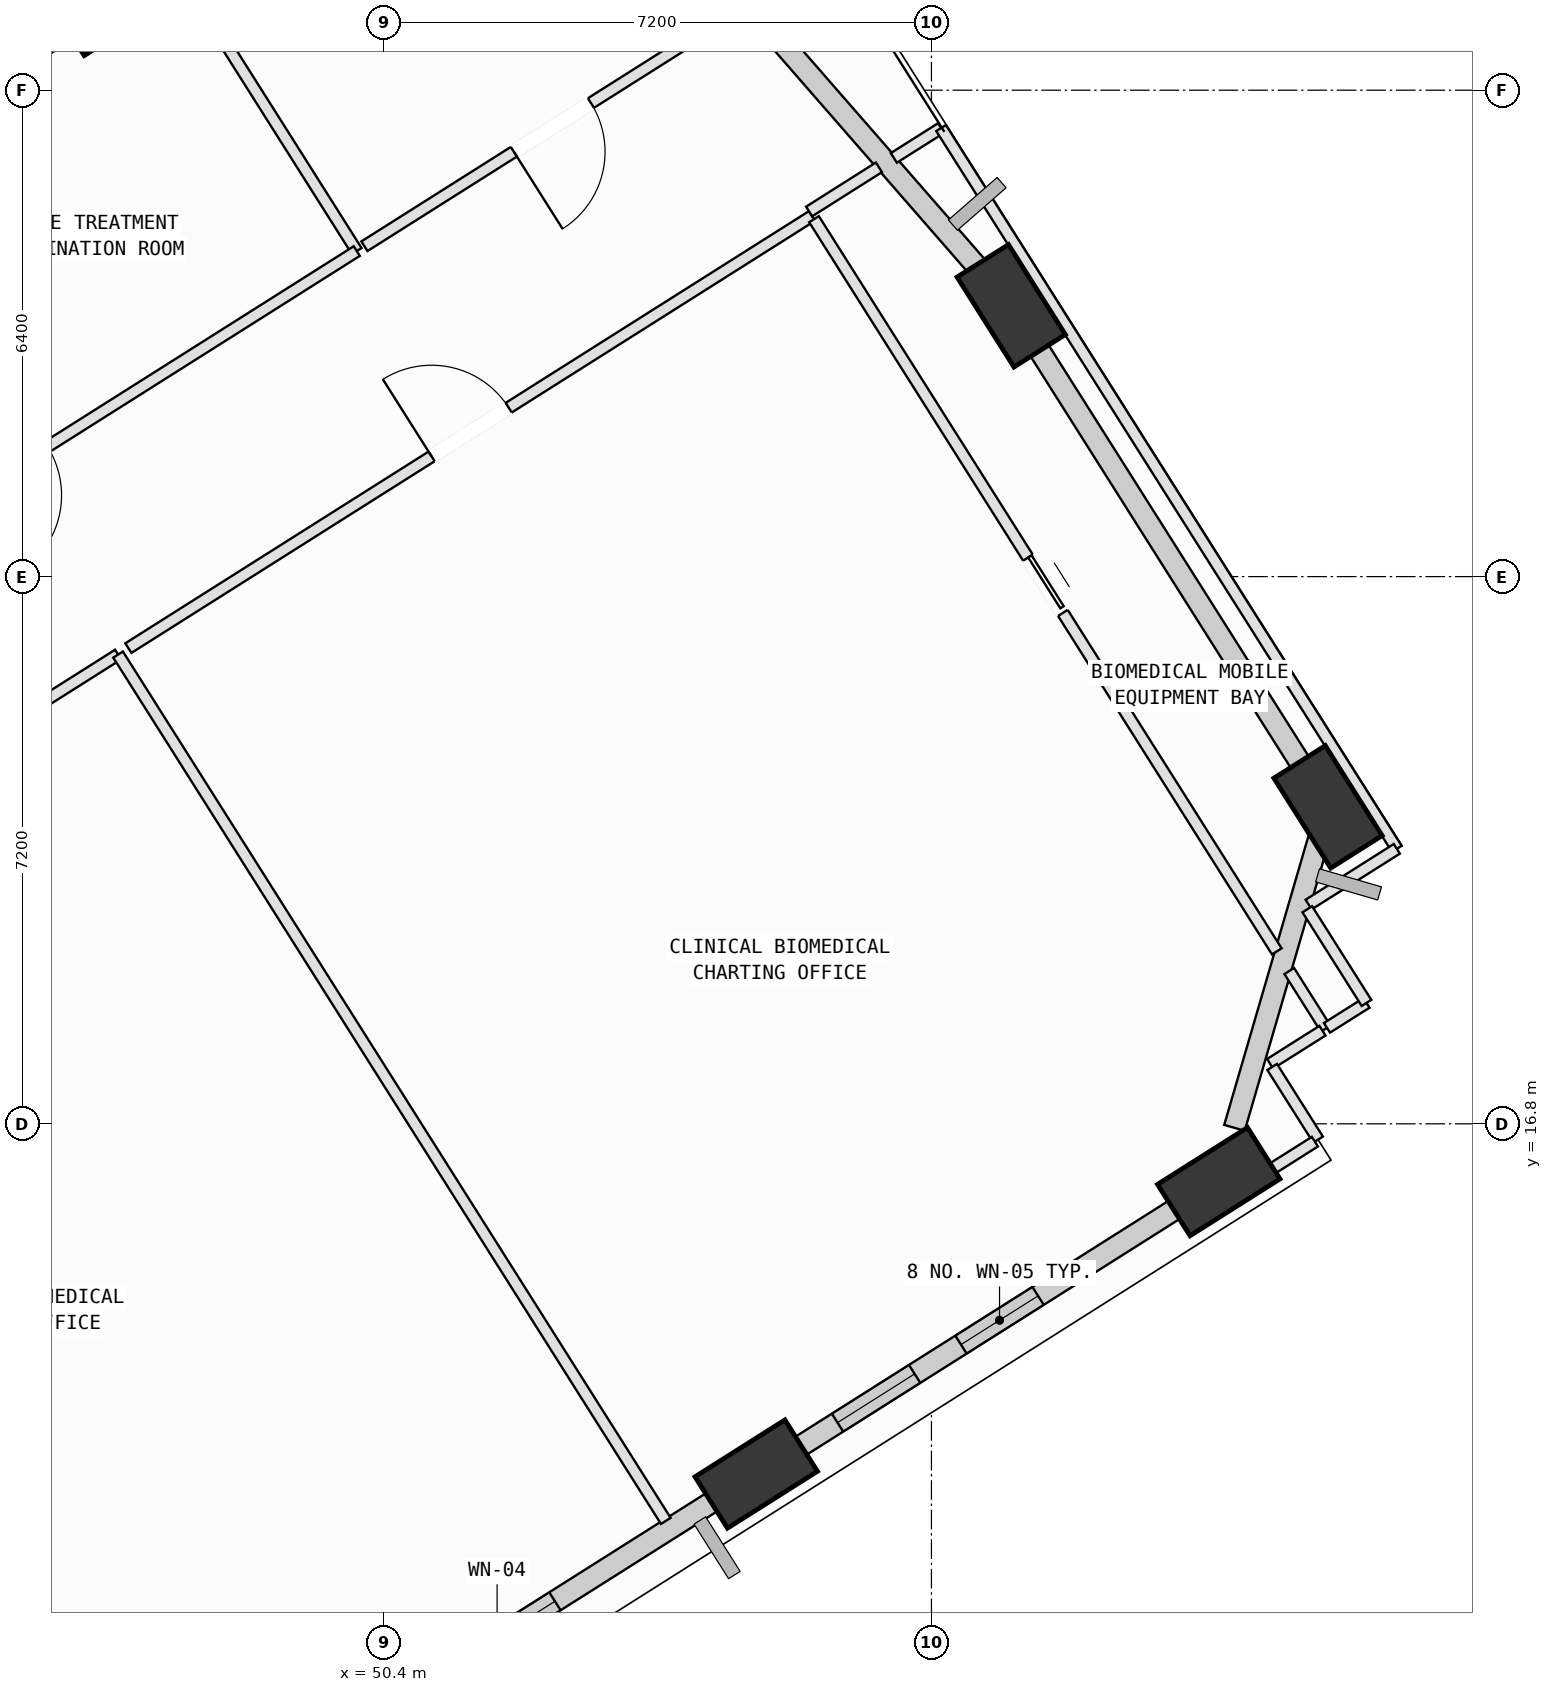
"""IFC4 building model, lengths in metres.
Left out: names, types, materials, properties, quantities, classifications, styles, units other than length and angle.
Written with IfcOpenShell. Run it as: python <this file> out.ifc"""

import sys

from ifc_helpers import new_model, si_unit, direction, frame, frame_2d, origin, origin_2d, place, context, subcontext, project, spatial, rectangle, extrude, element, fill, save


model = new_model("IFC4")
c1 = context("Model", 3, precision=1e-05, world=origin(), true_north=direction((0.0, 1.0)))
c2 = subcontext(c1, "Body", "Model", "MODEL_VIEW")
j1 = project(units=[si_unit("LENGTHUNIT", "METRE"), si_unit("PLANEANGLEUNIT", "RADIAN")], contexts=[c1])
p1 = place(None, origin())
s1 = spatial("IfcSite", under=j1, at=p1, CompositionType="ELEMENT")
p2 = place(p1, origin())
s2 = spatial("IfcBuilding", under=s1, at=p2, CompositionType="ELEMENT")
p3 = place(p2, frame((0.0, 0.0, 161.8)))
s3 = spatial("IfcBuildingStorey", under=s2, at=p3, CompositionType="ELEMENT", Elevation=161.8)
p4 = place(p3, frame((55.294, 12.192, 0.002), z_axis=(0.051223513882, 0.089869011899, 0.994635467056), x_axis=(-0.997536992389, -0.04318182071, 0.055274579841)))
e1 = element("IfcColumn", 1, at=p4, inside=s3, PredefinedType="COLUMN", context=c2, shape_type="SweptSolid", body=[
    extrude(rectangle(XDim=1.4, YDim=0.8, at=origin_2d()), origin(), (0.0, 0.0, 1.0), 4.018),
])
p5 = place(p3, frame((61.38, 16.039, 0.002), z_axis=(0.035116863046, 0.114569523824, 0.992794354406), x_axis=(-0.963617165192, -0.259503165934, 0.064031756314)))
e2 = element("IfcColumn", 2, at=p5, inside=s3, PredefinedType="COLUMN", context=c2, shape_type="SweptSolid", body=[
    extrude(rectangle(XDim=1.4, YDim=0.8, at=origin_2d()), origin(), (0.0, 0.0, 1.0), 4.025),
])
p6 = place(p3, frame((62.818, 20.97, 0.002), z_axis=(0.014796306441, 0.120310950736, 0.99262598417), x_axis=(0.427941166072, -0.897980076646, 0.102460432986)))
e3 = element("IfcColumn", 3, at=p6, inside=s3, PredefinedType="COLUMN", context=c2, shape_type="SweptSolid", body=[
    extrude(rectangle(XDim=1.4, YDim=0.8, at=origin_2d()), origin(), (0.0, 0.0, 1.0), 4.026),
])
p7 = place(p3, frame((58.65, 27.563, 0.002), z_axis=(-0.012212860445, 0.103171328532, 0.994588619988), x_axis=(0.62947347893, -0.772043748813, 0.087815654881)))
e4 = element("IfcColumn", 4, at=p7, inside=s3, PredefinedType="COLUMN", context=c2, shape_type="SweptSolid", body=[
    extrude(rectangle(XDim=1.4, YDim=0.8, at=origin_2d()), origin(), (0.0, 0.0, 1.0), 4.018),
])
p8 = place(p3, frame((46.831, 31.567, 0.002), z_axis=(-0.028475531093, 0.054512044533, 0.998106998838), x_axis=(-0.502261756691, -0.864090923747, 0.032863403107)))
e5 = element("IfcColumn", 5, at=p8, inside=s3, PredefinedType="COLUMN", context=c2, shape_type="SweptSolid", body=[
    extrude(rectangle(XDim=1.4, YDim=0.8, at=origin_2d()), origin(), (0.0, 0.0, 1.0), 4.004),
])
p9 = place(p3, frame((55.038, 12.03, 0.0), z_axis=(0.0, 0.0, 1.0), x_axis=(-0.845251842868, -0.53436815224, 0.0)))
e6 = element("IfcWall", 6, at=p9, inside=s3, PredefinedType="SOLIDWALL", context=c2, shape_type="SweptSolid", body=[
    extrude(rectangle(XDim=6.218, YDim=0.28, at=frame_2d((3.109, 0.0))), origin(), (0.0, 0.0, 1.0), 3.165),
])
p10 = place(p9, frame((2.83, 0.0, 0.75)))
e7 = element("IfcOpeningElement", 7, at=p10, cuts=e6, PredefinedType="OPENING", context=c2, shape_type="SweptSolid", body=[
    extrude(rectangle(XDim=1.8, YDim=2.05, at=frame_2d((0.9, 1.025))), frame((0.0, 0.15, 0.0), z_axis=(0.0, -1.0, 0.0), x_axis=(1.0, 0.0, 0.0)), (0.0, 0.0, 1.0), 0.3),
])
p11 = place(p3, frame((61.137, 15.885, 0.0), z_axis=(0.0, 0.0, 1.0), x_axis=(-0.845271359126, -0.534337280602, 0.0)))
e8 = element("IfcWall", 8, at=p11, inside=s3, PredefinedType="SOLIDWALL", context=c2, shape_type="SweptSolid", body=[
    extrude(rectangle(XDim=6.242, YDim=0.28, at=frame_2d((3.121, 0.0))), origin(), (0.0, 0.0, 1.0), 3.165),
])
p12 = place(p11, frame((2.525, 0.0, 0.75)))
e9 = element("IfcOpeningElement", 9, at=p12, cuts=e8, PredefinedType="OPENING", context=c2, shape_type="SweptSolid", body=[
    extrude(rectangle(XDim=1.2, YDim=1.75, at=frame_2d((0.6, 0.875))), frame((0.0, 0.15, 0.0), z_axis=(0.0, -1.0, 0.0), x_axis=(1.0, 0.0, 0.0)), (0.0, 0.0, 1.0), 0.3),
])
p13 = place(p11, frame((4.446, 0.0, 0.75)))
e10 = element("IfcOpeningElement", 10, at=p13, cuts=e8, PredefinedType="OPENING", context=c2, shape_type="SweptSolid", body=[
    extrude(rectangle(XDim=1.2, YDim=1.75, at=frame_2d((0.6, 0.875))), frame((0.0, 0.15, 0.0), z_axis=(0.0, -1.0, 0.0), x_axis=(1.0, 0.0, 0.0)), (0.0, 0.0, 1.0), 0.3),
])
p14 = place(p3, frame((62.747, 20.727, 0.0), z_axis=(0.0, 0.0, 1.0), x_axis=(-0.279882390753, -0.96003429488, 0.0)))
e11 = element("IfcWall", 11, at=p14, inside=s3, PredefinedType="SOLIDWALL", context=c2, shape_type="SweptSolid", body=[
    extrude(rectangle(XDim=4.145, YDim=0.28, at=frame_2d((2.073, 0.0))), origin(), (0.0, 0.0, 1.0), 3.165),
])
p15 = place(p3, frame((58.81, 27.31, 0.0), z_axis=(0.0, 0.0, 1.0), x_axis=(0.534364927874, -0.845253881303, 0.0)))
e12 = element("IfcWall", 12, at=p15, inside=s3, PredefinedType="SOLIDWALL", context=c2, shape_type="SweptSolid", body=[
    extrude(rectangle(XDim=6.84, YDim=0.28, at=frame_2d((3.42, 0.0))), origin(), (0.0, 0.0, 1.0), 3.165),
])
p16 = place(p3, frame((52.411, 34.717, 0.0), z_axis=(0.0, 0.0, 1.0), x_axis=(0.657255929189, -0.753667462178, 0.0)))
e13 = element("IfcWall", 13, at=p16, inside=s3, PredefinedType="SOLIDWALL", context=c2, shape_type="SweptSolid", body=[
    extrude(rectangle(XDim=8.838, YDim=0.28, at=frame_2d((4.419, 0.0))), origin(), (0.0, 0.0, 1.0), 3.165),
])
p17 = place(p3, frame((43.738, 29.612, 0.0), z_axis=(0.0, 0.0, 1.0), x_axis=(0.845268690178, 0.534341502604, 0.0)))
e14 = element("IfcWall", 14, at=p17, inside=s3, PredefinedType="SOLIDWALL", context=c2, shape_type="SweptSolid", body=[
    extrude(rectangle(XDim=3.189, YDim=0.28, at=frame_2d((1.594, 0.0))), origin(), (0.0, 0.0, 1.0), 3.045),
])
p18 = place(p17, frame((0.915, 0.0, 0.75)))
e15 = element("IfcOpeningElement", 15, at=p18, cuts=e14, PredefinedType="OPENING", context=c2, shape_type="SweptSolid", body=[
    extrude(rectangle(XDim=1.2, YDim=1.75, at=frame_2d((0.6, 0.875))), frame((0.0, 0.15, 0.0), z_axis=(0.0, -1.0, 0.0), x_axis=(1.0, 0.0, 0.0)), (0.0, 0.0, 1.0), 0.3),
])
p19 = place(p3, frame((41.23, 19.39, 0.0), z_axis=(0.0, 0.0, 1.0), x_axis=(0.845230176883, 0.534402421482, 0.0)))
e16 = element("IfcWall", 16, at=p19, inside=s3, PredefinedType="PARTITIONING", context=c2, shape_type="SweptSolid", body=[
    extrude(rectangle(XDim=6.707, YDim=0.15, at=frame_2d((3.354, 0.0))), origin(), (0.0, 0.0, 1.0), 3.065),
])
p20 = place(p19, frame((2.753, 0.0, 0.0)))
e17 = element("IfcOpeningElement", 17, at=p20, cuts=e16, PredefinedType="OPENING", context=c2, shape_type="SweptSolid", body=[
    extrude(rectangle(XDim=1.2, YDim=2.15, at=frame_2d((0.6, 1.075))), frame((0.0, 0.085, 0.0), z_axis=(0.0, -1.0, 0.0), x_axis=(1.0, 0.0, 0.0)), (0.0, 0.0, 1.0), 0.17),
])
p21 = place(p3, frame((46.899, 22.974, 0.0), z_axis=(0.0, 0.0, 1.0), x_axis=(0.534341679517, -0.845268578341, 0.0)))
e18 = element("IfcWall", 18, at=p21, inside=s3, PredefinedType="PARTITIONING", context=c2, shape_type="SweptSolid", body=[
    extrude(rectangle(XDim=13.486, YDim=0.15, at=frame_2d((6.743, 0.0))), origin(), (0.0, 0.0, 1.0), 3.415),
])
p22 = place(p3, frame((47.034, 23.059, 0.0), z_axis=(0.0, 0.0, 1.0), x_axis=(0.845254384561, 0.534364131825, 0.0)))
e19 = element("IfcWall", 19, at=p22, inside=s3, PredefinedType="PARTITIONING", context=c2, shape_type="SweptSolid", body=[
    extrude(rectangle(XDim=10.641, YDim=0.15, at=frame_2d((5.32, 0.0))), origin(), (0.0, 0.0, 1.0), 3.78),
])
p23 = place(p22, frame((4.72, 0.0, 0.0)))
e20 = element("IfcOpeningElement", 20, at=p23, cuts=e19, PredefinedType="OPENING", context=c2, shape_type="SweptSolid", body=[
    extrude(rectangle(XDim=1.2, YDim=2.15, at=frame_2d((0.6, 1.075))), frame((0.0, 0.085, 0.0), z_axis=(0.0, -1.0, 0.0), x_axis=(1.0, 0.0, 0.0)), (0.0, 0.0, 1.0), 0.17),
])
p24 = place(p3, frame((56.055, 28.703, 0.0), z_axis=(0.0, 0.0, 1.0), x_axis=(0.534282303531, -0.845306110314, 0.0)))
e21 = element("IfcWall", 21, at=p24, inside=s3, PredefinedType="PARTITIONING", context=c2, shape_type="SweptSolid", body=[
    extrude(rectangle(XDim=11.397, YDim=0.15, at=frame_2d((5.698, 0.0))), origin(), (0.0, 0.0, 1.0), 3.78),
])
p25 = place(p24, frame((5.269, 0.0, 0.0)))
e22 = element("IfcOpeningElement", 22, at=p25, cuts=e21, PredefinedType="OPENING", context=c2, shape_type="SweptSolid", body=[
    extrude(rectangle(XDim=0.86, YDim=2.06, at=frame_2d((0.43, 1.03))), frame((0.0, 0.085, 0.0), z_axis=(0.0, -1.0, 0.0), x_axis=(1.0, 0.0, 0.0)), (0.0, 0.0, 1.0), 0.17),
])
p26 = place(p3, frame((62.308, 18.81, 0.0), z_axis=(0.0, 0.0, 1.0), x_axis=(0.534177361829, -0.845372430417, 0.0)))
e23 = element("IfcWall", 23, at=p26, inside=s3, PredefinedType="PARTITIONING", context=c2, shape_type="SweptSolid", body=[
    extrude(rectangle(XDim=0.897, YDim=0.15, at=frame_2d((0.448, 0.0))), origin(), (0.0, 0.0, 1.0), 3.78),
])
p27 = place(p3, frame((62.745, 18.025, 0.0), z_axis=(0.0, 0.0, 1.0), x_axis=(-0.845752205071, -0.533575868661, 0.0)))
e24 = element("IfcWall", 24, at=p27, inside=s3, PredefinedType="PARTITIONING", context=c2, shape_type="SweptSolid", body=[
    extrude(rectangle(XDim=0.815, YDim=0.15, at=frame_2d((0.407, 0.0))), origin(), (0.0, 0.0, 1.0), 3.78),
])
p28 = place(p3, frame((62.083, 17.548, 0.0), z_axis=(0.0, 0.0, 1.0), x_axis=(0.534106701777, -0.845417075246, 0.0)))
e25 = element("IfcWall", 25, at=p28, inside=s3, PredefinedType="PARTITIONING", context=c2, shape_type="SweptSolid", body=[
    extrude(rectangle(XDim=1.131, YDim=0.15, at=frame_2d((0.565, 0.0))), origin(), (0.0, 0.0, 1.0), 3.78),
])
p29 = place(p3, frame((62.645, 16.565, 0.0), z_axis=(0.0, 0.0, 1.0), x_axis=(-0.845418071895, -0.534105124215, 0.0)))
e26 = element("IfcWall", 26, at=p29, inside=s3, PredefinedType="PARTITIONING", context=c2, shape_type="SweptSolid", body=[
    extrude(rectangle(XDim=1.638, YDim=0.15, at=frame_2d((0.819, 0.0))), origin(), (0.0, 0.0, 1.0), 3.78),
])
p30 = place(p3, frame((55.984, 12.355, 0.0), z_axis=(0.0, 0.0, 1.0), x_axis=(-0.845381621372, -0.534162816233, 0.0)))
e27 = element("IfcWall", 27, at=p30, inside=s3, PredefinedType="PARTITIONING", context=c2, shape_type="SweptSolid", body=[
    extrude(rectangle(XDim=0.974, YDim=0.15, at=frame_2d((0.487, 0.0))), origin(), (0.0, 0.0, 1.0), 3.165),
])
p31 = place(p3, frame((47.701, 31.981, 0.0), z_axis=(0.0, 0.0, 1.0), x_axis=(0.534410719014, -0.845224930657, 0.0)))
e28 = element("IfcWall", 28, at=p31, inside=s3, PredefinedType="PARTITIONING", context=c2, shape_type="SweptSolid", body=[
    extrude(rectangle(XDim=4.375, YDim=0.15, at=frame_2d((2.188, 0.0))), origin(), (0.0, 0.0, 1.0), 3.78),
])
p32 = place(p3, frame((50.039, 28.283, 0.0), z_axis=(0.0, 0.0, 1.0), x_axis=(-0.845280431179, -0.534322929197, 0.0)))
e29 = element("IfcWall", 29, at=p32, inside=s3, PredefinedType="PARTITIONING", context=c2, shape_type="SweptSolid", body=[
    extrude(rectangle(XDim=10.828, YDim=0.15, at=frame_2d((5.414, 0.0))), origin(), (0.0, 0.0, 1.0), 3.78),
])
p33 = place(p32, frame((4.814, 0.0, 0.0)))
e30 = element("IfcOpeningElement", 30, at=p33, cuts=e29, PredefinedType="OPENING", context=c2, shape_type="SweptSolid", body=[
    extrude(rectangle(XDim=1.2, YDim=2.15, at=frame_2d((0.6, 1.075))), frame((0.0, 0.085, 0.0), z_axis=(0.0, -1.0, 0.0), x_axis=(1.0, 0.0, 0.0)), (0.0, 0.0, 1.0), 0.17),
])
p34 = place(p3, frame((55.086, 31.474, 0.0), z_axis=(0.0, 0.0, 1.0), x_axis=(-0.845228065929, -0.534405760229, 0.0)))
e31 = element("IfcWall", 31, at=p34, inside=s3, PredefinedType="PARTITIONING", context=c2, shape_type="SweptSolid", body=[
    extrude(rectangle(XDim=5.852, YDim=0.15, at=frame_2d((2.926, 0.0))), origin(), (0.0, 0.0, 1.0), 3.78),
])
p35 = place(p34, frame((2.326, 0.0, 0.0)))
e32 = element("IfcOpeningElement", 32, at=p35, cuts=e31, PredefinedType="OPENING", context=c2, shape_type="SweptSolid", body=[
    extrude(rectangle(XDim=1.2, YDim=2.15, at=frame_2d((0.6, 1.075))), frame((0.0, 0.085, 0.0), z_axis=(0.0, -1.0, 0.0), x_axis=(1.0, 0.0, 0.0)), (0.0, 0.0, 1.0), 0.17),
])
p36 = place(p3, frame((63.324, 18.391, 0.0), z_axis=(0.0, 0.0, 1.0), x_axis=(-0.845715263121, -0.533634419547, 0.0)))
e33 = element("IfcWall", 33, at=p36, inside=s3, PredefinedType="PARTITIONING", context=c2, shape_type="SweptSolid", body=[
    extrude(rectangle(XDim=0.615, YDim=0.15, at=frame_2d((0.308, 0.0))), origin(), (0.0, 0.0, 1.0), 3.78),
])
p37 = place(p3, frame((55.991, 28.804, 0.0), z_axis=(0.0, 0.0, 1.0), x_axis=(0.844954487562, 0.534838212872, 0.0)))
e34 = element("IfcWall", 34, at=p37, inside=s3, PredefinedType="PARTITIONING", context=c2, shape_type="SweptSolid", body=[
    extrude(rectangle(XDim=1.086, YDim=0.15, at=frame_2d((0.543, 0.0))), origin(), (0.0, 0.0, 1.0), 3.78),
])
p38 = place(p3, frame((57.105, 29.509, 0.0), z_axis=(0.0, 0.0, 1.0), x_axis=(0.845378510232, 0.534167739982, 0.0)))
e35 = element("IfcWall", 35, at=p38, inside=s3, PredefinedType="PARTITIONING", context=c2, shape_type="SweptSolid", body=[
    extrude(rectangle(XDim=0.736, YDim=0.15, at=frame_2d((0.368, 0.0))), origin(), (0.0, 0.0, 1.0), 3.78),
])
p39 = place(p3, frame((57.727, 29.902, 0.0), z_axis=(0.0, 0.0, 1.0), x_axis=(0.534367056092, -0.845252535852, 0.0)))
e36 = element("IfcWall", 36, at=p39, inside=s3, PredefinedType="PARTITIONING", context=c2, shape_type="SweptSolid", body=[
    extrude(rectangle(XDim=11.22, YDim=0.15, at=frame_2d((5.61, 0.0))), origin(), (0.0, 0.0, 1.0), 3.165),
])
p40 = place(p3, frame((63.723, 20.418, 0.0), z_axis=(0.0, 0.0, 1.0), x_axis=(-0.845378951725, -0.534167041271, 0.0)))
e37 = element("IfcWall", 37, at=p40, inside=s3, PredefinedType="PARTITIONING", context=c2, shape_type="SweptSolid", body=[
    extrude(rectangle(XDim=1.372, YDim=0.15, at=frame_2d((0.686, 0.0))), origin(), (0.0, 0.0, 1.0), 3.78),
])
p41 = place(p3, frame((62.545, 19.623, 0.0), z_axis=(0.0, 0.0, 1.0), x_axis=(0.534478142886, -0.845182296772, 0.0)))
e38 = element("IfcWall", 38, at=p41, inside=s3, PredefinedType="PARTITIONING", context=c2, shape_type="SweptSolid", body=[
    extrude(rectangle(XDim=1.458, YDim=0.15, at=frame_2d((0.729, 0.0))), origin(), (0.0, 0.0, 1.0), 3.78),
])
p42 = place(p10, origin())
e39 = element("IfcWindow", 39, at=p42, inside=s3, PartitioningType="SINGLE_PANEL", PredefinedType="WINDOW", context=c2, shape_type="SweptSolid", body=[
    extrude(rectangle(XDim=1.8, YDim=2.05, at=frame_2d((0.9, 1.025))), frame((0.0, 0.03, 0.0), z_axis=(0.0, -1.0, 0.0), x_axis=(1.0, 0.0, 0.0)), (0.0, 0.0, 1.0), 0.06),
])
fill(e7, e39)
p43 = place(p12, origin())
e40 = element("IfcWindow", 40, at=p43, inside=s3, PartitioningType="SINGLE_PANEL", PredefinedType="WINDOW", context=c2, shape_type="SweptSolid", body=[
    extrude(rectangle(XDim=1.2, YDim=1.75, at=frame_2d((0.6, 0.875))), frame((0.0, 0.03, 0.0), z_axis=(0.0, -1.0, 0.0), x_axis=(1.0, 0.0, 0.0)), (0.0, 0.0, 1.0), 0.06),
])
fill(e9, e40)
p44 = place(p13, origin())
e41 = element("IfcWindow", 41, at=p44, inside=s3, PartitioningType="SINGLE_PANEL", PredefinedType="WINDOW", context=c2, shape_type="SweptSolid", body=[
    extrude(rectangle(XDim=1.2, YDim=1.75, at=frame_2d((0.6, 0.875))), frame((0.0, 0.03, 0.0), z_axis=(0.0, -1.0, 0.0), x_axis=(1.0, 0.0, 0.0)), (0.0, 0.0, 1.0), 0.06),
])
fill(e10, e41)
p45 = place(p23, origin())
e42 = element("IfcDoor", 42, at=p45, inside=s3, OperationType="SINGLE_SWING_LEFT", PredefinedType="DOOR", context=c2, shape_type="SweptSolid", body=[
    extrude(rectangle(XDim=1.2, YDim=2.15, at=frame_2d((0.6, 1.075))), frame((0.0, 0.025, 0.0), z_axis=(0.0, -1.0, 0.0), x_axis=(1.0, 0.0, 0.0)), (0.0, 0.0, 1.0), 0.05),
])
fill(e20, e42)
p46 = place(p35, origin())
e43 = element("IfcDoor", 43, at=p46, inside=s3, OperationType="SINGLE_SWING_RIGHT", PredefinedType="DOOR", context=c2, shape_type="SweptSolid", body=[
    extrude(rectangle(XDim=1.2, YDim=2.15, at=frame_2d((0.6, 1.075))), frame((0.0, 0.025, 0.0), z_axis=(0.0, -1.0, 0.0), x_axis=(1.0, 0.0, 0.0)), (0.0, 0.0, 1.0), 0.05),
])
fill(e32, e43)
p47 = place(p25, origin())
e44 = element("IfcDoor", 44, at=p47, inside=s3, OperationType="SLIDING_TO_LEFT", PredefinedType="DOOR", context=c2, shape_type="SweptSolid", body=[
    extrude(rectangle(XDim=0.86, YDim=2.06, at=frame_2d((0.43, 1.03))), frame((0.0, 0.025, 0.0), z_axis=(0.0, -1.0, 0.0), x_axis=(1.0, 0.0, 0.0)), (0.0, 0.0, 1.0), 0.05),
])
fill(e22, e44)
save(model, sys.argv[1])
